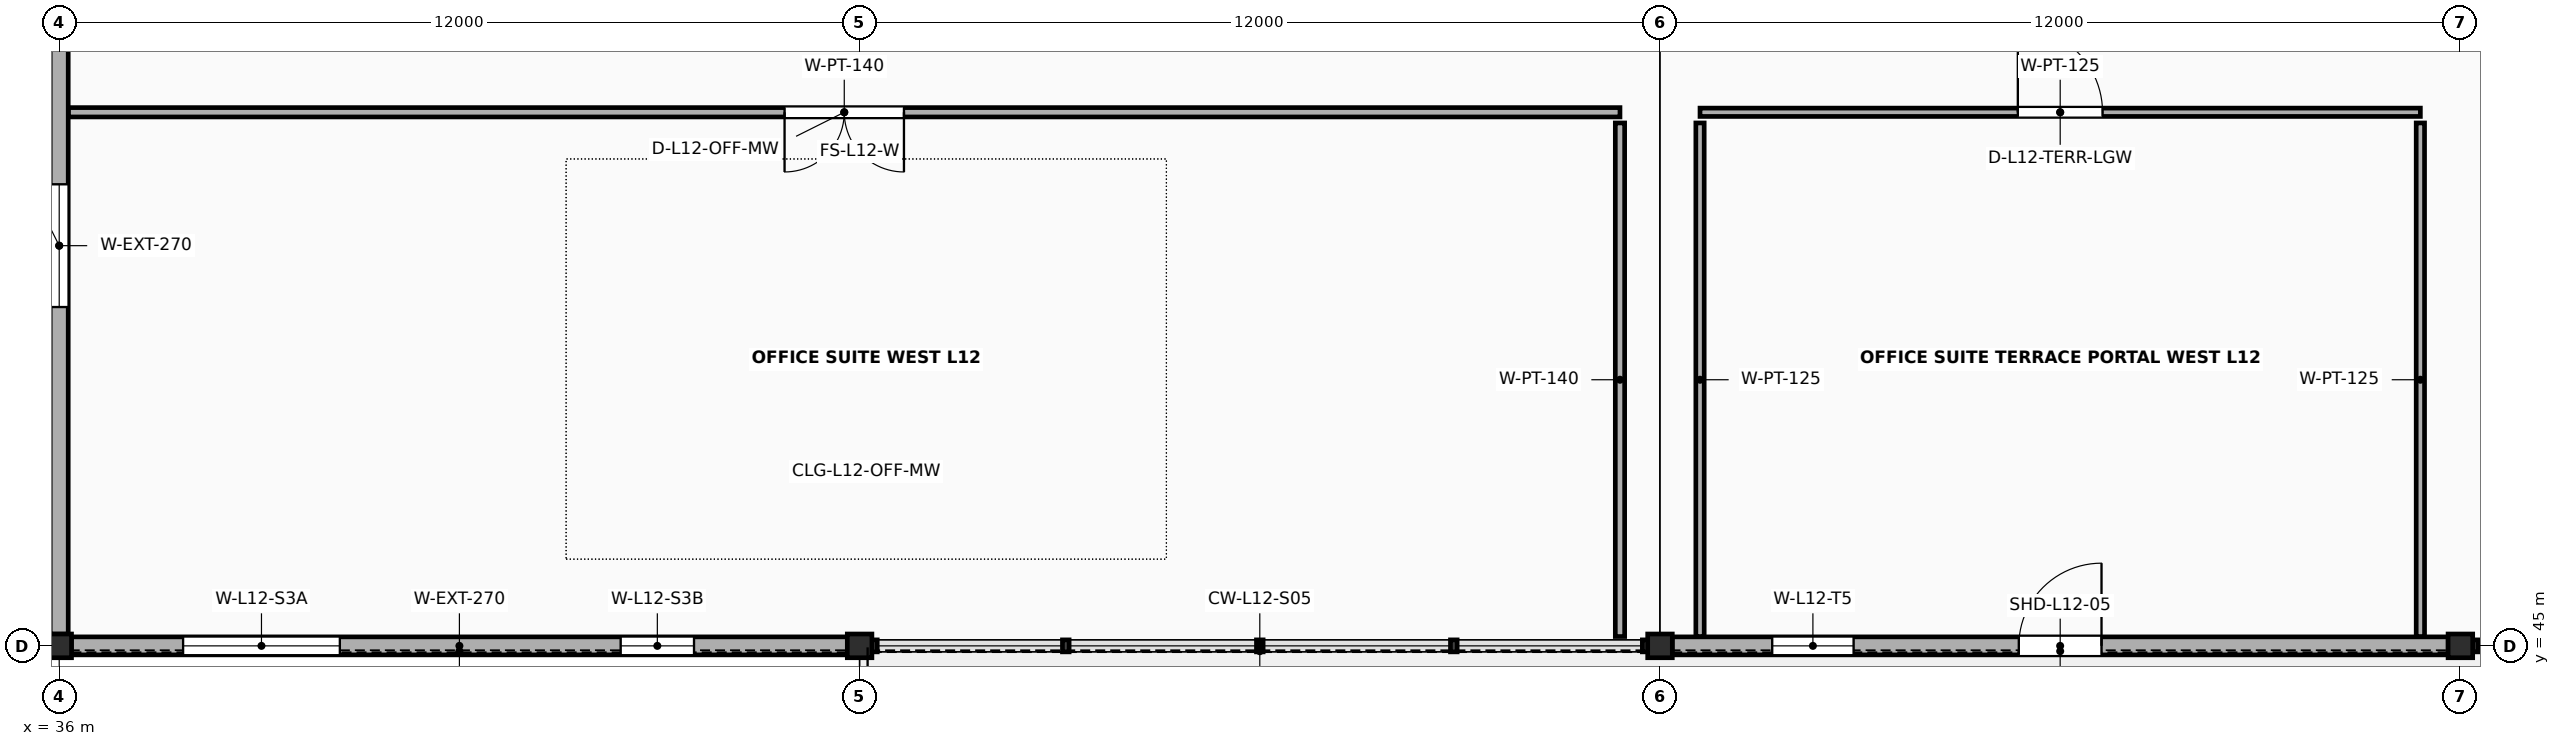
"""IFC4 building model, lengths in metres.
Left out: names, types, materials, properties, quantities, classifications, styles, units other than length and angle.
Written with IfcOpenShell. Run it as: python <this file> out.ifc"""

import sys

from ifc_helpers import new_model, si_unit, direction, frame, frame_2d, origin, origin_2d, place, context, subcontext, project, spatial, rectangle, i_section, extrude, element, fill, save


model = new_model("IFC4")
c1 = context("Model", 3, precision=1e-05, world=origin(), true_north=direction((0.0, 1.0)))
c2 = subcontext(c1, "Body", "Model", "MODEL_VIEW")
j1 = project(units=[si_unit("LENGTHUNIT", "METRE"), si_unit("PLANEANGLEUNIT", "RADIAN")], contexts=[c1])
p1 = place(None, origin())
s1 = spatial("IfcSite", under=j1, at=p1, CompositionType="ELEMENT")
p2 = place(p1, origin())
s2 = spatial("IfcBuilding", under=s1, at=p2, CompositionType="ELEMENT")
p3 = place(p2, frame((0.0, 0.0, 49.6)))
s3 = spatial("IfcBuildingStorey", under=s2, at=p3, CompositionType="ELEMENT", Elevation=49.6)
for number, where, z_axis, x_axis in (
    (1, (36.0, 45.0, 0.0), (0.0, 0.0, 1.0), (1.0, 0.0, 0.0)),
    (2, (48.0, 45.0, 0.0), (0.0, 0.0, 1.0), (1.0, 0.0, 0.0)),
    (3, (60.0, 45.0, 0.0), (0.0, 0.0, 1.0), (1.0, 0.0, 0.0)),
    (4, (72.0, 45.0, 0.0), (0.0, 0.0, 1.0), (1.0, 0.0, 0.0)),
):
    element("IfcColumn", number, at=place(p3, frame(where, z_axis=z_axis, x_axis=x_axis)), inside=s3, PredefinedType="COLUMN", context=c2, shape_type="SweptSolid", body=[
        extrude(i_section(OverallWidth=0.369, OverallDepth=0.356, WebThickness=0.011, FlangeThickness=0.018, FilletRadius=0.018, at=origin_2d()), origin(), (0.0, 0.0, 1.0), 4.0),
    ])
p4 = place(p3, frame((36.183, 45.0, 0.0), z_axis=(0.0, 0.0, 1.0), x_axis=(1.0, 0.0, 0.0)))
e5 = element("IfcWall", 5, at=p4, inside=s3, PredefinedType="SOLIDWALL", context=c2, shape_type="SweptSolid", body=[
    extrude(rectangle(XDim=11.635, YDim=0.27, at=frame_2d((5.817, 0.0))), origin(), (0.0, 0.0, 1.0), 3.301),
])
p5 = place(p4, frame((1.675, 0.0, 0.78)))
e6 = element("IfcOpeningElement", 6, at=p5, cuts=e5, PredefinedType="OPENING", context=c2, shape_type="SweptSolid", body=[
    extrude(rectangle(XDim=2.35, YDim=1.25, at=frame_2d((1.175, 0.625))), frame((0.0, 0.15, 0.0), z_axis=(0.0, -1.0, 0.0), x_axis=(1.0, 0.0, 0.0)), (0.0, 0.0, 1.0), 0.3),
])
p6 = place(p4, frame((8.235, 0.0, 0.78)))
e7 = element("IfcOpeningElement", 7, at=p6, cuts=e5, PredefinedType="OPENING", context=c2, shape_type="SweptSolid", body=[
    extrude(rectangle(XDim=1.1, YDim=1.42, at=frame_2d((0.55, 0.71))), frame((0.0, 0.15, 0.0), z_axis=(0.0, -1.0, 0.0), x_axis=(1.0, 0.0, 0.0)), (0.0, 0.0, 1.0), 0.3),
])
p7 = place(p3, frame((60.183, 45.0, 0.0), z_axis=(0.0, 0.0, 1.0), x_axis=(1.0, 0.0, 0.0)))
e8 = element("IfcWall", 8, at=p7, inside=s3, PredefinedType="SOLIDWALL", context=c2, shape_type="SweptSolid", body=[
    extrude(rectangle(XDim=11.635, YDim=0.27, at=frame_2d((5.817, 0.0))), origin(), (0.0, 0.0, 1.0), 3.301),
])
p8 = place(p7, frame((5.197, 0.0, 0.0)))
e9 = element("IfcOpeningElement", 9, at=p8, cuts=e8, PredefinedType="OPENING", context=c2, shape_type="SweptSolid", body=[
    extrude(rectangle(XDim=1.24, YDim=2.24, at=frame_2d((0.62, 1.12))), frame((0.0, 0.15, 0.0), z_axis=(0.0, -1.0, 0.0), x_axis=(1.0, 0.0, 0.0)), (0.0, 0.0, 1.0), 0.3),
])
p9 = place(p7, frame((1.5, 0.0, 0.85)))
e10 = element("IfcOpeningElement", 10, at=p9, cuts=e8, PredefinedType="OPENING", context=c2, shape_type="SweptSolid", body=[
    extrude(rectangle(XDim=1.22, YDim=1.42, at=frame_2d((0.61, 0.71))), frame((0.0, 0.15, 0.0), z_axis=(0.0, -1.0, 0.0), x_axis=(1.0, 0.0, 0.0)), (0.0, 0.0, 1.0), 0.3),
])
p10 = place(p3, frame((36.0, 45.176, 0.0), z_axis=(0.0, 0.0, 1.0), x_axis=(0.0, 1.0, 0.0)))
e11 = element("IfcWall", 11, at=p10, inside=s3, PredefinedType="SOLIDWALL", context=c2, shape_type="SweptSolid", body=[
    extrude(rectangle(XDim=11.648, YDim=0.27, at=frame_2d((5.824, 0.0))), origin(), (0.0, 0.0, 1.0), 3.301),
])
p11 = place(p10, frame((4.904, 0.0, 0.78)))
e12 = element("IfcOpeningElement", 12, at=p11, cuts=e11, PredefinedType="OPENING", context=c2, shape_type="SweptSolid", body=[
    extrude(rectangle(XDim=1.84, YDim=1.42, at=frame_2d((0.92, 0.71))), frame((0.0, 0.15, 0.0), z_axis=(0.0, -1.0, 0.0), x_axis=(1.0, 0.0, 0.0)), (0.0, 0.0, 1.0), 0.3),
])
p12 = place(p3, frame((36.14, 53.0, 0.0), z_axis=(0.0, 0.0, 1.0), x_axis=(1.0, 0.0, 0.0)))
e13 = element("IfcWall", 13, at=p12, inside=s3, PredefinedType="PARTITIONING", context=c2, shape_type="SweptSolid", body=[
    extrude(rectangle(XDim=23.26, YDim=0.14, at=frame_2d((11.63, 0.0))), origin(), (0.0, 0.0, 1.0), 2.88),
])
p13 = place(p12, frame((10.735, 0.0, 0.0)))
e14 = element("IfcOpeningElement", 14, at=p13, cuts=e13, PredefinedType="OPENING", context=c2, shape_type="SweptSolid", body=[
    extrude(rectangle(XDim=1.79, YDim=2.39, at=frame_2d((0.895, 1.195))), frame((0.0, 0.085, 0.0), z_axis=(0.0, -1.0, 0.0), x_axis=(1.0, 0.0, 0.0)), (0.0, 0.0, 1.0), 0.17),
])
p14 = place(p3, frame((59.4, 45.14, 0.0), z_axis=(0.0, 0.0, 1.0), x_axis=(0.0, 1.0, 0.0)))
e15 = element("IfcWall", 15, at=p14, inside=s3, PredefinedType="PARTITIONING", context=c2, shape_type="SweptSolid", body=[
    extrude(rectangle(XDim=7.7, YDim=0.14, at=frame_2d((3.85, 0.0))), origin(), (0.0, 0.0, 1.0), 2.88),
])
p15 = place(p3, frame((60.6, 53.0, 0.0), z_axis=(0.0, 0.0, 1.0), x_axis=(1.0, 0.0, 0.0)))
e16 = element("IfcWall", 16, at=p15, inside=s3, PredefinedType="PARTITIONING", context=c2, shape_type="SweptSolid", body=[
    extrude(rectangle(XDim=10.8, YDim=0.125, at=frame_2d((5.4, 0.0))), origin(), (0.0, 0.0, 1.0), 2.88),
])
p16 = place(p15, frame((4.765, 0.0, 0.0)))
e17 = element("IfcOpeningElement", 17, at=p16, cuts=e16, PredefinedType="OPENING", context=c2, shape_type="SweptSolid", body=[
    extrude(rectangle(XDim=1.27, YDim=2.27, at=frame_2d((0.635, 1.135))), frame((0.0, 0.077, 0.0), z_axis=(0.0, -1.0, 0.0), x_axis=(1.0, 0.0, 0.0)), (0.0, 0.0, 1.0), 0.155),
])
for number, where, z_axis, x_axis in (
    (18, (60.6, 45.14, 0.0), (0.0, 0.0, 1.0), (0.0, 1.0, 0.0)),
    (19, (71.4, 45.14, 0.0), (0.0, 0.0, 1.0), (0.0, 1.0, 0.0)),
):
    element("IfcWall", number, at=place(p3, frame(where, z_axis=z_axis, x_axis=x_axis)), inside=s3, PredefinedType="PARTITIONING", context=c2, shape_type="SweptSolid", body=[
        extrude(rectangle(XDim=7.7, YDim=0.125, at=frame_2d((3.85, 0.0))), origin(), (0.0, 0.0, 1.0), 2.88),
    ])
p17 = place(p5, origin())
e20 = element("IfcWindow", 20, at=p17, inside=s3, PartitioningType="DOUBLE_PANEL_VERTICAL", PredefinedType="WINDOW", context=c2, shape_type="SweptSolid", body=[
    extrude(rectangle(XDim=2.35, YDim=1.25, at=frame_2d((1.175, 0.625))), frame((0.0, 0.03, 0.0), z_axis=(0.0, -1.0, 0.0), x_axis=(1.0, 0.0, 0.0)), (0.0, 0.0, 1.0), 0.06),
])
fill(e6, e20)
p18 = place(p6, origin())
e21 = element("IfcWindow", 21, at=p18, inside=s3, PartitioningType="SINGLE_PANEL", PredefinedType="WINDOW", context=c2, shape_type="SweptSolid", body=[
    extrude(rectangle(XDim=1.1, YDim=1.42, at=frame_2d((0.55, 0.71))), frame((0.0, 0.03, 0.0), z_axis=(0.0, -1.0, 0.0), x_axis=(1.0, 0.0, 0.0)), (0.0, 0.0, 1.0), 0.06),
])
fill(e7, e21)
p19 = place(p8, origin())
e22 = element("IfcDoor", 22, at=p19, inside=s3, OperationType="SINGLE_SWING_RIGHT", PredefinedType="DOOR", context=c2, shape_type="SweptSolid", body=[
    extrude(rectangle(XDim=1.24, YDim=2.24, at=frame_2d((0.62, 1.12))), frame((0.0, 0.025, 0.0), z_axis=(0.0, -1.0, 0.0), x_axis=(1.0, 0.0, 0.0)), (0.0, 0.0, 1.0), 0.05),
])
fill(e9, e22)
p20 = place(p9, origin())
e23 = element("IfcWindow", 23, at=p20, inside=s3, PartitioningType="SINGLE_PANEL", PredefinedType="WINDOW", context=c2, shape_type="SweptSolid", body=[
    extrude(rectangle(XDim=1.22, YDim=1.42, at=frame_2d((0.61, 0.71))), frame((0.0, 0.03, 0.0), z_axis=(0.0, -1.0, 0.0), x_axis=(1.0, 0.0, 0.0)), (0.0, 0.0, 1.0), 0.06),
])
fill(e10, e23)
p21 = place(p11, origin())
e24 = element("IfcWindow", 24, at=p21, inside=s3, PartitioningType="DOUBLE_PANEL_VERTICAL", PredefinedType="WINDOW", context=c2, shape_type="SweptSolid", body=[
    extrude(rectangle(XDim=1.84, YDim=1.42, at=frame_2d((0.92, 0.71))), frame((0.0, 0.03, 0.0), z_axis=(0.0, -1.0, 0.0), x_axis=(1.0, 0.0, 0.0)), (0.0, 0.0, 1.0), 0.06),
])
fill(e12, e24)
p22 = place(p13, origin())
e25 = element("IfcDoor", 25, at=p22, inside=s3, OperationType="DOUBLE_DOOR_SINGLE_SWING", PredefinedType="DOOR", context=c2, shape_type="SweptSolid", body=[
    extrude(rectangle(XDim=1.79, YDim=2.39, at=frame_2d((0.895, 1.195))), frame((0.0, 0.025, 0.0), z_axis=(0.0, -1.0, 0.0), x_axis=(1.0, 0.0, 0.0)), (0.0, 0.0, 1.0), 0.05),
])
fill(e14, e25)
p23 = place(p16, origin())
e26 = element("IfcDoor", 26, at=p23, inside=s3, OperationType="SINGLE_SWING_LEFT", PredefinedType="DOOR", context=c2, shape_type="SweptSolid", body=[
    extrude(rectangle(XDim=1.27, YDim=2.27, at=frame_2d((0.635, 1.135))), frame((0.0, 0.025, 0.0), z_axis=(0.0, -1.0, 0.0), x_axis=(1.0, 0.0, 0.0)), (0.0, 0.0, 1.0), 0.05),
])
fill(e17, e26)
save(model, sys.argv[1])
